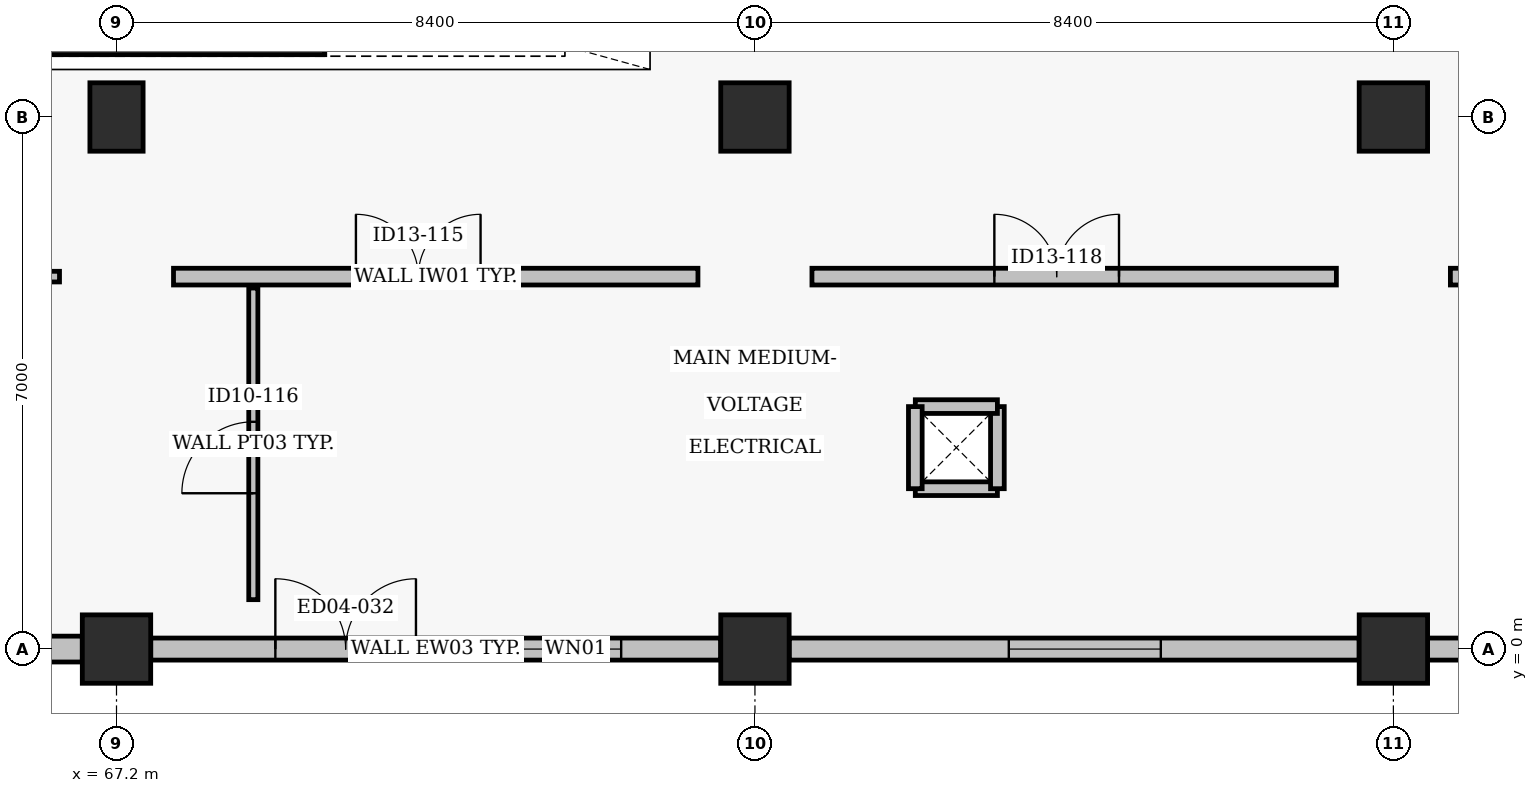
"""IFC4 building model, lengths in metres.
Left out: names, types, materials, properties, quantities, classifications, styles, units other than length and angle.
Written with IfcOpenShell. Run it as: python <this file> out.ifc"""

import sys

from ifc_helpers import new_model, si_unit, direction, frame, frame_2d, origin, origin_2d, place, context, subcontext, project, spatial, rectangle, extrude, element, fill, save


model = new_model("IFC4")
c1 = context("Model", 3, precision=1e-05, world=origin(), true_north=direction((0.0, 1.0)))
c2 = subcontext(c1, "Body", "Model", "MODEL_VIEW")
j1 = project(units=[si_unit("LENGTHUNIT", "METRE"), si_unit("PLANEANGLEUNIT", "RADIAN")], contexts=[c1])
p1 = place(None, origin())
s1 = spatial("IfcSite", under=j1, at=p1, CompositionType="ELEMENT")
p2 = place(p1, origin())
s2 = spatial("IfcBuilding", under=s1, at=p2, CompositionType="ELEMENT")
p3 = place(p2, origin())
s3 = spatial("IfcBuildingStorey", under=s2, at=p3, CompositionType="ELEMENT", Elevation=0.0)
p4 = place(p3, frame((67.2, 0.0, -0.46), z_axis=(0.0, 0.0, 1.0), x_axis=(1.0, 0.0, 0.0)))
e1 = element("IfcColumn", 1, at=p4, inside=s3, PredefinedType="COLUMN", context=c2, shape_type="SweptSolid", body=[
    extrude(rectangle(XDim=0.9, YDim=0.9, at=origin_2d()), origin(), (0.0, 0.0, 1.0), 5.9),
])
p5 = place(p3, frame((67.2, 7.0, -0.46), z_axis=(0.0, 0.0, 1.0), x_axis=(1.0, 0.0, 0.0)))
e2 = element("IfcColumn", 2, at=p5, inside=s3, PredefinedType="COLUMN", context=c2, shape_type="SweptSolid", body=[
    extrude(rectangle(XDim=0.7, YDim=0.9, at=origin_2d()), origin(), (0.0, 0.0, 1.0), 5.9),
])
for number, where, z_axis, x_axis in (
    (3, (75.6, 0.0, -0.46), (0.0, 0.0, 1.0), (1.0, 0.0, 0.0)),
    (4, (75.6, 7.0, -0.46), (0.0, 0.0, 1.0), (1.0, 0.0, 0.0)),
    (5, (84.0, 0.0, -0.46), (0.0, 0.0, 1.0), (1.0, 0.0, 0.0)),
    (6, (84.0, 7.0, -0.46), (0.0, 0.0, 1.0), (1.0, 0.0, 0.0)),
):
    element("IfcColumn", number, at=place(p3, frame(where, z_axis=z_axis, x_axis=x_axis)), inside=s3, PredefinedType="COLUMN", context=c2, shape_type="SweptSolid", body=[
        extrude(rectangle(XDim=0.9, YDim=0.9, at=origin_2d()), origin(), (0.0, 0.0, 1.0), 5.9),
    ])
p6 = place(p3, frame((59.25, 0.0, 0.0), z_axis=(0.0, 0.0, 1.0), x_axis=(1.0, 0.0, 0.0)))
e7 = element("IfcWall", 7, at=p6, inside=s3, PredefinedType="SOLIDWALL", context=c2, shape_type="SweptSolid", body=[
    extrude(rectangle(XDim=7.5, YDim=0.34, at=frame_2d((3.75, 0.0))), origin(), (0.0, 0.0, 1.0), 4.625),
])
p7 = place(p6, frame((1.64, 0.0, 0.0)))
e8 = element("IfcOpeningElement", 8, at=p7, cuts=e7, PredefinedType="OPENING", context=c2, shape_type="SweptSolid", body=[
    extrude(rectangle(XDim=1.85, YDim=2.2, at=frame_2d((0.925, 1.1))), frame((0.0, 0.18, 0.0), z_axis=(0.0, -1.0, 0.0), x_axis=(1.0, 0.0, 0.0)), (0.0, 0.0, 1.0), 0.36),
])
p8 = place(p6, frame((4.39, 0.0, 1.05)))
e9 = element("IfcOpeningElement", 9, at=p8, cuts=e7, PredefinedType="OPENING", context=c2, shape_type="SweptSolid", body=[
    extrude(rectangle(XDim=2.0, YDim=1.45, at=frame_2d((1.0, 0.725))), frame((0.0, 0.18, 0.0), z_axis=(0.0, -1.0, 0.0), x_axis=(1.0, 0.0, 0.0)), (0.0, 0.0, 1.0), 0.36),
])
p9 = place(p3, frame((67.65, 0.0, 0.0), z_axis=(0.0, 0.0, 1.0), x_axis=(1.0, 0.0, 0.0)))
e10 = element("IfcWall", 10, at=p9, inside=s3, PredefinedType="SOLIDWALL", context=c2, shape_type="SweptSolid", body=[
    extrude(rectangle(XDim=7.5, YDim=0.29, at=frame_2d((3.75, 0.0))), origin(), (0.0, 0.0, 1.0), 4.625),
])
p10 = place(p9, frame((1.64, 0.0, 0.0)))
e11 = element("IfcOpeningElement", 11, at=p10, cuts=e10, PredefinedType="OPENING", context=c2, shape_type="SweptSolid", body=[
    extrude(rectangle(XDim=1.85, YDim=2.2, at=frame_2d((0.925, 1.1))), frame((0.0, 0.155, 0.0), z_axis=(0.0, -1.0, 0.0), x_axis=(1.0, 0.0, 0.0)), (0.0, 0.0, 1.0), 0.31),
])
p11 = place(p9, frame((4.39, 0.0, 1.05)))
e12 = element("IfcOpeningElement", 12, at=p11, cuts=e10, PredefinedType="OPENING", context=c2, shape_type="SweptSolid", body=[
    extrude(rectangle(XDim=1.8, YDim=1.5, at=frame_2d((0.9, 0.75))), frame((0.0, 0.155, 0.0), z_axis=(0.0, -1.0, 0.0), x_axis=(1.0, 0.0, 0.0)), (0.0, 0.0, 1.0), 0.31),
])
p12 = place(p3, frame((76.05, 0.0, 0.0), z_axis=(0.0, 0.0, 1.0), x_axis=(1.0, 0.0, 0.0)))
e13 = element("IfcWall", 13, at=p12, inside=s3, PredefinedType="SOLIDWALL", context=c2, shape_type="SweptSolid", body=[
    extrude(rectangle(XDim=7.5, YDim=0.29, at=frame_2d((3.75, 0.0))), origin(), (0.0, 0.0, 1.0), 4.625),
])
p13 = place(p12, frame((2.89, 0.0, 1.05)))
e14 = element("IfcOpeningElement", 14, at=p13, cuts=e13, PredefinedType="OPENING", context=c2, shape_type="SweptSolid", body=[
    extrude(rectangle(XDim=2.0, YDim=1.45, at=frame_2d((1.0, 0.725))), frame((0.0, 0.155, 0.0), z_axis=(0.0, -1.0, 0.0), x_axis=(1.0, 0.0, 0.0)), (0.0, 0.0, 1.0), 0.31),
])
p14 = place(p3, frame((84.45, 0.0, 0.0), z_axis=(0.0, 0.0, 1.0), x_axis=(1.0, 0.0, 0.0)))
e15 = element("IfcWall", 15, at=p14, inside=s3, PredefinedType="SOLIDWALL", context=c2, shape_type="SweptSolid", body=[
    extrude(rectangle(XDim=7.5, YDim=0.29, at=frame_2d((3.75, 0.0))), origin(), (0.0, 0.0, 1.0), 4.625),
])
p15 = place(p14, frame((2.89, 0.0, 1.05)))
e16 = element("IfcOpeningElement", 16, at=p15, cuts=e15, PredefinedType="OPENING", context=c2, shape_type="SweptSolid", body=[
    extrude(rectangle(XDim=1.8, YDim=1.5, at=frame_2d((0.9, 0.75))), frame((0.0, 0.155, 0.0), z_axis=(0.0, -1.0, 0.0), x_axis=(1.0, 0.0, 0.0)), (0.0, 0.0, 1.0), 0.31),
])
p16 = place(p3, frame((61.06, 7.96, 0.0), z_axis=(0.0, 0.0, 1.0), x_axis=(1.0, 0.0, 0.0)))
e17 = element("IfcWall", 17, at=p16, inside=s3, PredefinedType="SHEAR", context=c2, shape_type="SweptSolid", body=[
    extrude(rectangle(XDim=8.88, YDim=0.28, at=frame_2d((4.44, 0.0))), origin(), (0.0, 0.0, 1.0), 5.44),
])
p17 = place(p3, frame((77.71, 2.11, 0.0), z_axis=(0.0, 0.0, 1.0), x_axis=(1.0, 0.0, 0.0)))
e18 = element("IfcWall", 18, at=p17, inside=s3, PredefinedType="SOLIDWALL", context=c2, shape_type="SweptSolid", body=[
    extrude(rectangle(XDim=1.08, YDim=0.18, at=frame_2d((0.54, 0.0))), origin(), (0.0, 0.0, 1.0), 2.6),
])
p18 = place(p3, frame((78.79, 2.11, 0.0), z_axis=(0.0, 0.0, 1.0), x_axis=(0.0, 1.0, 0.0)))
e19 = element("IfcWall", 19, at=p18, inside=s3, PredefinedType="SOLIDWALL", context=c2, shape_type="SweptSolid", body=[
    extrude(rectangle(XDim=1.08, YDim=0.18, at=frame_2d((0.54, 0.0))), origin(), (0.0, 0.0, 1.0), 2.6),
])
p19 = place(p3, frame((78.79, 3.19, 0.0), z_axis=(0.0, 0.0, 1.0), x_axis=(-1.0, 0.0, 0.0)))
e20 = element("IfcWall", 20, at=p19, inside=s3, PredefinedType="SOLIDWALL", context=c2, shape_type="SweptSolid", body=[
    extrude(rectangle(XDim=1.08, YDim=0.18, at=frame_2d((0.54, 0.0))), origin(), (0.0, 0.0, 1.0), 2.6),
])
p20 = place(p3, frame((77.71, 3.19, 0.0), z_axis=(0.0, 0.0, 1.0), x_axis=(0.0, -1.0, 0.0)))
e21 = element("IfcWall", 21, at=p20, inside=s3, PredefinedType="SOLIDWALL", context=c2, shape_type="SweptSolid", body=[
    extrude(rectangle(XDim=1.08, YDim=0.18, at=frame_2d((0.54, 0.0))), origin(), (0.0, 0.0, 1.0), 2.6),
])
p21 = place(p3, frame((59.55, 4.9, 0.0), z_axis=(0.0, 0.0, 1.0), x_axis=(1.0, 0.0, 0.0)))
e22 = element("IfcWall", 22, at=p21, inside=s3, PredefinedType="PARTITIONING", context=c2, shape_type="SweptSolid", body=[
    extrude(rectangle(XDim=6.9, YDim=0.14, at=frame_2d((3.45, 0.0))), origin(), (0.0, 0.0, 1.0), 2.55),
])
p22 = place(p21, frame((2.4, 0.0, 0.0)))
e23 = element("IfcOpeningElement", 23, at=p22, cuts=e22, PredefinedType="OPENING", context=c2, shape_type="SweptSolid", body=[
    extrude(rectangle(XDim=0.98, YDim=2.12, at=frame_2d((0.49, 1.06))), frame((0.0, 0.08, 0.0), z_axis=(0.0, -1.0, 0.0), x_axis=(1.0, 0.0, 0.0)), (0.0, 0.0, 1.0), 0.16),
])
p23 = place(p3, frame((67.95, 4.9, 0.0), z_axis=(0.0, 0.0, 1.0), x_axis=(1.0, 0.0, 0.0)))
e24 = element("IfcWall", 24, at=p23, inside=s3, PredefinedType="SOLIDWALL", context=c2, shape_type="SweptSolid", body=[
    extrude(rectangle(XDim=6.9, YDim=0.22, at=frame_2d((3.45, 0.0))), origin(), (0.0, 0.0, 1.0), 2.55),
])
p24 = place(p23, frame((2.4, 0.0, 0.0)))
e25 = element("IfcOpeningElement", 25, at=p24, cuts=e24, PredefinedType="OPENING", context=c2, shape_type="SweptSolid", body=[
    extrude(rectangle(XDim=1.64, YDim=2.16, at=frame_2d((0.82, 1.08))), frame((0.0, 0.12, 0.0), z_axis=(0.0, -1.0, 0.0), x_axis=(1.0, 0.0, 0.0)), (0.0, 0.0, 1.0), 0.24),
])
p25 = place(p3, frame((69.0, 0.65, 0.0), z_axis=(0.0, 0.0, 1.0), x_axis=(0.0, 1.0, 0.0)))
e26 = element("IfcWall", 26, at=p25, inside=s3, PredefinedType="PARTITIONING", context=c2, shape_type="SweptSolid", body=[
    extrude(rectangle(XDim=4.1, YDim=0.12, at=frame_2d((2.05, 0.0))), origin(), (0.0, 0.0, 1.0), 2.5),
])
p26 = place(p25, frame((1.4, 0.0, 0.0)))
e27 = element("IfcOpeningElement", 27, at=p26, cuts=e26, PredefinedType="OPENING", context=c2, shape_type="SweptSolid", body=[
    extrude(rectangle(XDim=0.94, YDim=2.08, at=frame_2d((0.47, 1.04))), frame((0.0, 0.07, 0.0), z_axis=(0.0, -1.0, 0.0), x_axis=(1.0, 0.0, 0.0)), (0.0, 0.0, 1.0), 0.14),
])
p27 = place(p3, frame((76.35, 4.9, 0.0), z_axis=(0.0, 0.0, 1.0), x_axis=(1.0, 0.0, 0.0)))
e28 = element("IfcWall", 28, at=p27, inside=s3, PredefinedType="SOLIDWALL", context=c2, shape_type="SweptSolid", body=[
    extrude(rectangle(XDim=6.9, YDim=0.22, at=frame_2d((3.45, 0.0))), origin(), (0.0, 0.0, 1.0), 2.55),
])
p28 = place(p27, frame((2.4, 0.0, 0.0)))
e29 = element("IfcOpeningElement", 29, at=p28, cuts=e28, PredefinedType="OPENING", context=c2, shape_type="SweptSolid", body=[
    extrude(rectangle(XDim=1.64, YDim=2.16, at=frame_2d((0.82, 1.08))), frame((0.0, 0.12, 0.0), z_axis=(0.0, -1.0, 0.0), x_axis=(1.0, 0.0, 0.0)), (0.0, 0.0, 1.0), 0.24),
])
p29 = place(p3, frame((84.75, 4.9, 0.0), z_axis=(0.0, 0.0, 1.0), x_axis=(1.0, 0.0, 0.0)))
e30 = element("IfcWall", 30, at=p29, inside=s3, PredefinedType="SOLIDWALL", context=c2, shape_type="SweptSolid", body=[
    extrude(rectangle(XDim=6.9, YDim=0.22, at=frame_2d((3.45, 0.0))), origin(), (0.0, 0.0, 1.0), 2.55),
])
p30 = place(p29, frame((2.4, 0.0, 0.0)))
e31 = element("IfcOpeningElement", 31, at=p30, cuts=e30, PredefinedType="OPENING", context=c2, shape_type="SweptSolid", body=[
    extrude(rectangle(XDim=1.64, YDim=2.16, at=frame_2d((0.82, 1.08))), frame((0.0, 0.12, 0.0), z_axis=(0.0, -1.0, 0.0), x_axis=(1.0, 0.0, 0.0)), (0.0, 0.0, 1.0), 0.24),
])
p31 = place(p10, origin())
e32 = element("IfcDoor", 32, at=p31, inside=s3, OperationType="DOUBLE_DOOR_SINGLE_SWING", PredefinedType="DOOR", context=c2, shape_type="SweptSolid", body=[
    extrude(rectangle(XDim=1.85, YDim=2.2, at=frame_2d((0.925, 1.1))), frame((0.0, 0.025, 0.0), z_axis=(0.0, -1.0, 0.0), x_axis=(1.0, 0.0, 0.0)), (0.0, 0.0, 1.0), 0.05),
])
fill(e11, e32)
p32 = place(p11, origin())
e33 = element("IfcWindow", 33, at=p32, inside=s3, PartitioningType="DOUBLE_PANEL_VERTICAL", PredefinedType="WINDOW", context=c2, shape_type="SweptSolid", body=[
    extrude(rectangle(XDim=1.8, YDim=1.5, at=frame_2d((0.9, 0.75))), frame((0.0, 0.03, 0.0), z_axis=(0.0, -1.0, 0.0), x_axis=(1.0, 0.0, 0.0)), (0.0, 0.0, 1.0), 0.06),
])
fill(e12, e33)
p33 = place(p13, origin())
e34 = element("IfcWindow", 34, at=p33, inside=s3, PartitioningType="DOUBLE_PANEL_VERTICAL", PredefinedType="WINDOW", context=c2, shape_type="SweptSolid", body=[
    extrude(rectangle(XDim=2.0, YDim=1.45, at=frame_2d((1.0, 0.725))), frame((0.0, 0.03, 0.0), z_axis=(0.0, -1.0, 0.0), x_axis=(1.0, 0.0, 0.0)), (0.0, 0.0, 1.0), 0.06),
])
fill(e14, e34)
p34 = place(p24, origin())
e35 = element("IfcDoor", 35, at=p34, inside=s3, OperationType="DOUBLE_DOOR_SINGLE_SWING", PredefinedType="DOOR", context=c2, shape_type="SweptSolid", body=[
    extrude(rectangle(XDim=1.64, YDim=2.16, at=frame_2d((0.82, 1.08))), frame((0.0, 0.025, 0.0), z_axis=(0.0, -1.0, 0.0), x_axis=(1.0, 0.0, 0.0)), (0.0, 0.0, 1.0), 0.05),
])
fill(e25, e35)
p35 = place(p26, origin())
e36 = element("IfcDoor", 36, at=p35, inside=s3, OperationType="SINGLE_SWING_LEFT", PredefinedType="DOOR", context=c2, shape_type="SweptSolid", body=[
    extrude(rectangle(XDim=0.94, YDim=2.08, at=frame_2d((0.47, 1.04))), frame((0.0, 0.025, 0.0), z_axis=(0.0, -1.0, 0.0), x_axis=(1.0, 0.0, 0.0)), (0.0, 0.0, 1.0), 0.05),
])
fill(e27, e36)
p36 = place(p28, origin())
e37 = element("IfcDoor", 37, at=p36, inside=s3, OperationType="DOUBLE_DOOR_SINGLE_SWING", PredefinedType="DOOR", context=c2, shape_type="SweptSolid", body=[
    extrude(rectangle(XDim=1.64, YDim=2.16, at=frame_2d((0.82, 1.08))), frame((0.0, 0.025, 0.0), z_axis=(0.0, -1.0, 0.0), x_axis=(1.0, 0.0, 0.0)), (0.0, 0.0, 1.0), 0.05),
])
fill(e29, e37)
save(model, sys.argv[1])
